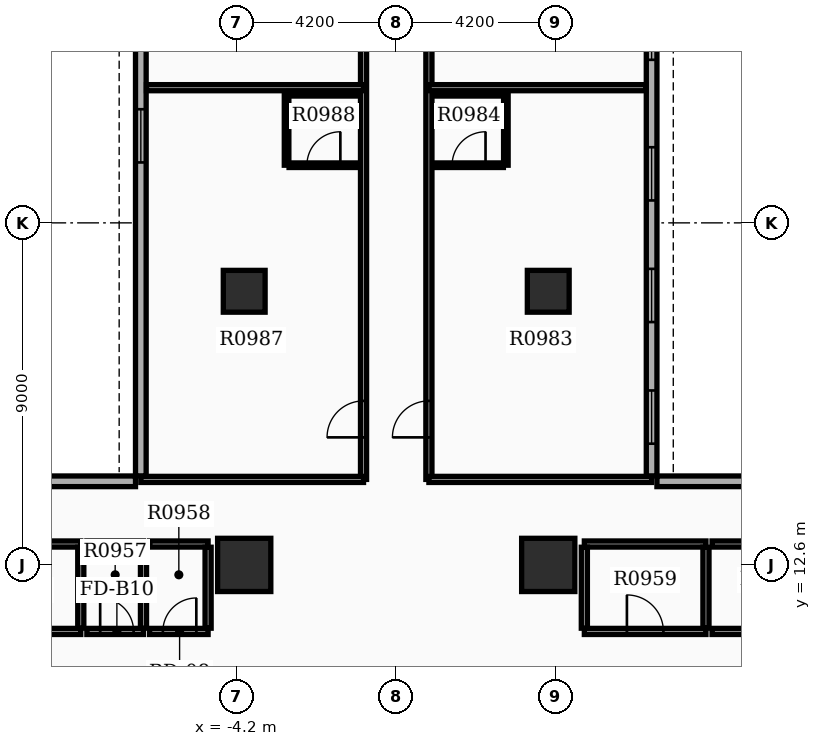
"""IFC4 building model, lengths in metres.
Left out: names, types, materials, properties, quantities, classifications, styles, units other than length and angle.
Written with IfcOpenShell. Run it as: python <this file> out.ifc"""

import sys

from ifc_helpers import new_model, si_unit, direction, frame, frame_2d, origin, origin_2d, place, context, subcontext, project, spatial, rectangle, extrude, element, fill, save


model = new_model("IFC4")
c1 = context("Model", 3, precision=1e-05, world=origin(), true_north=direction((0.0, 1.0)))
c2 = subcontext(c1, "Body", "Model", "MODEL_VIEW")
j1 = project(units=[si_unit("LENGTHUNIT", "METRE"), si_unit("PLANEANGLEUNIT", "RADIAN")], contexts=[c1])
p1 = place(None, origin())
s1 = spatial("IfcSite", under=j1, at=p1, CompositionType="ELEMENT")
p2 = place(p1, origin())
s2 = spatial("IfcBuilding", under=s1, at=p2, CompositionType="ELEMENT")
p3 = place(p2, frame((0.0, 0.0, 63.9)))
s3 = spatial("IfcBuildingStorey", under=s2, at=p3, CompositionType="ELEMENT", Elevation=63.9)
for number, where, z_axis, x_axis in (
    (1, (4.0, 12.6, 0.0), (0.0, 0.0, 1.0), (1.0, 0.0, 0.0)),
    (2, (-4.0, 12.6, 0.0), (0.0, 0.0, 1.0), (1.0, 0.0, 0.0)),
):
    element("IfcColumn", number, at=place(p3, frame(where, z_axis=z_axis, x_axis=x_axis)), inside=s3, PredefinedType="COLUMN", context=c2, shape_type="SweptSolid", body=[
        extrude(rectangle(XDim=1.4, YDim=1.4, at=origin_2d()), origin(), (0.0, 0.0, 1.0), 3.9),
    ])
for number, where, z_axis, x_axis in (
    (3, (-4.0, 19.8, 0.0), (0.0, 0.0, 1.0), (1.0, 0.0, 0.0)),
    (4, (4.0, 19.8, 0.0), (0.0, 0.0, 1.0), (1.0, 0.0, 0.0)),
):
    element("IfcColumn", number, at=place(p3, frame(where, z_axis=z_axis, x_axis=x_axis)), inside=s3, PredefinedType="COLUMN", context=c2, shape_type="SweptSolid", body=[
        extrude(rectangle(XDim=1.1, YDim=1.1, at=origin_2d()), origin(), (0.0, 0.0, 1.0), 3.9),
    ])
p4 = place(p3, frame((6.72, 14.94, 0.0), z_axis=(0.0, 0.0, 1.0), x_axis=(0.0, 1.0, 0.0)))
e5 = element("IfcWall", 5, at=p4, inside=s3, PredefinedType="STANDARD", context=c2, shape_type="SweptSolid", body=[
    extrude(rectangle(XDim=20.1, YDim=0.28, at=frame_2d((10.05, 0.0))), origin(), (0.0, 0.0, 1.0), 2.91),
])
p5 = place(p4, frame((0.85, 0.0, 0.8)))
e6 = element("IfcOpeningElement", 6, at=p5, cuts=e5, PredefinedType="OPENING", context=c2, shape_type="SweptSolid", body=[
    extrude(rectangle(XDim=1.4, YDim=1.6, at=frame_2d((0.7, 0.8))), frame((0.0, 0.15, 0.0), z_axis=(0.0, -1.0, 0.0), x_axis=(1.0, 0.0, 0.0)), (0.0, 0.0, 1.0), 0.3),
])
p6 = place(p4, frame((4.05, 0.0, 0.8)))
e7 = element("IfcOpeningElement", 7, at=p6, cuts=e5, PredefinedType="OPENING", context=c2, shape_type="SweptSolid", body=[
    extrude(rectangle(XDim=1.4, YDim=1.6, at=frame_2d((0.7, 0.8))), frame((0.0, 0.15, 0.0), z_axis=(0.0, -1.0, 0.0), x_axis=(1.0, 0.0, 0.0)), (0.0, 0.0, 1.0), 0.3),
])
p7 = place(p4, frame((7.25, 0.0, 0.8)))
e8 = element("IfcOpeningElement", 8, at=p7, cuts=e5, PredefinedType="OPENING", context=c2, shape_type="SweptSolid", body=[
    extrude(rectangle(XDim=1.4, YDim=1.6, at=frame_2d((0.7, 0.8))), frame((0.0, 0.15, 0.0), z_axis=(0.0, -1.0, 0.0), x_axis=(1.0, 0.0, 0.0)), (0.0, 0.0, 1.0), 0.3),
])
p8 = place(p4, frame((10.95, 0.0, 0.8)))
e9 = element("IfcOpeningElement", 9, at=p8, cuts=e5, PredefinedType="OPENING", context=c2, shape_type="SweptSolid", body=[
    extrude(rectangle(XDim=1.4, YDim=1.6, at=frame_2d((0.7, 0.8))), frame((0.0, 0.15, 0.0), z_axis=(0.0, -1.0, 0.0), x_axis=(1.0, 0.0, 0.0)), (0.0, 0.0, 1.0), 0.3),
])
p9 = place(p3, frame((-6.72, 35.04, 0.0), z_axis=(0.0, 0.0, 1.0), x_axis=(0.0, -1.0, 0.0)))
e10 = element("IfcWall", 10, at=p9, inside=s3, PredefinedType="STANDARD", context=c2, shape_type="SweptSolid", body=[
    extrude(rectangle(XDim=20.1, YDim=0.28, at=frame_2d((10.05, 0.0))), origin(), (0.0, 0.0, 1.0), 2.91),
])
p10 = place(p9, frame((0.85, 0.0, 0.8)))
e11 = element("IfcOpeningElement", 11, at=p10, cuts=e10, PredefinedType="OPENING", context=c2, shape_type="SweptSolid", body=[
    extrude(rectangle(XDim=1.4, YDim=1.6, at=frame_2d((0.7, 0.8))), frame((0.0, 0.15, 0.0), z_axis=(0.0, -1.0, 0.0), x_axis=(1.0, 0.0, 0.0)), (0.0, 0.0, 1.0), 0.3),
])
p11 = place(p9, frame((4.05, 0.0, 0.8)))
e12 = element("IfcOpeningElement", 12, at=p11, cuts=e10, PredefinedType="OPENING", context=c2, shape_type="SweptSolid", body=[
    extrude(rectangle(XDim=1.4, YDim=1.6, at=frame_2d((0.7, 0.8))), frame((0.0, 0.15, 0.0), z_axis=(0.0, -1.0, 0.0), x_axis=(1.0, 0.0, 0.0)), (0.0, 0.0, 1.0), 0.3),
])
p12 = place(p9, frame((7.25, 0.0, 0.8)))
e13 = element("IfcOpeningElement", 13, at=p12, cuts=e10, PredefinedType="OPENING", context=c2, shape_type="SweptSolid", body=[
    extrude(rectangle(XDim=1.4, YDim=1.6, at=frame_2d((0.7, 0.8))), frame((0.0, 0.15, 0.0), z_axis=(0.0, -1.0, 0.0), x_axis=(1.0, 0.0, 0.0)), (0.0, 0.0, 1.0), 0.3),
])
p13 = place(p9, frame((10.45, 0.0, 0.8)))
e14 = element("IfcOpeningElement", 14, at=p13, cuts=e10, PredefinedType="OPENING", context=c2, shape_type="SweptSolid", body=[
    extrude(rectangle(XDim=1.4, YDim=1.6, at=frame_2d((0.7, 0.8))), frame((0.0, 0.15, 0.0), z_axis=(0.0, -1.0, 0.0), x_axis=(1.0, 0.0, 0.0)), (0.0, 0.0, 1.0), 0.3),
])
for number, where, z_axis, x_axis in (
    (15, (13.16, 14.8, 0.0), (0.0, 0.0, 1.0), (-1.0, 0.0, 0.0)),
    (16, (-13.16, 14.8, 0.0), (0.0, 0.0, 1.0), (1.0, 0.0, 0.0)),
):
    element("IfcWall", number, at=place(p3, frame(where, z_axis=z_axis, x_axis=x_axis)), inside=s3, PredefinedType="STANDARD", context=c2, shape_type="SweptSolid", body=[
        extrude(rectangle(XDim=6.3, YDim=0.28, at=frame_2d((3.15, 0.0))), origin(), (0.0, 0.0, 1.0), 2.91),
    ])
p14 = place(p3, frame((-11.5, 10.85, 0.0), z_axis=(0.0, 0.0, 1.0), x_axis=(1.0, 0.0, 0.0)))
e17 = element("IfcWall", 17, at=p14, inside=s3, PredefinedType="PARTITIONING", context=c2, shape_type="SweptSolid", body=[
    extrude(rectangle(XDim=3.2, YDim=0.16, at=frame_2d((1.6, 0.0))), origin(), (0.0, 0.0, 1.0), 2.9),
])
p15 = place(p14, frame((1.12, 0.0, 0.0)))
e18 = element("IfcOpeningElement", 18, at=p15, cuts=e17, PredefinedType="OPENING", context=c2, shape_type="SweptSolid", body=[
    extrude(rectangle(XDim=0.96, YDim=2.15, at=frame_2d((0.48, 1.075))), frame((0.0, 0.09, 0.0), z_axis=(0.0, -1.0, 0.0), x_axis=(1.0, 0.0, 0.0)), (0.0, 0.0, 1.0), 0.18),
])
p16 = place(p3, frame((-11.5, 13.15, 0.0), z_axis=(0.0, 0.0, 1.0), x_axis=(1.0, 0.0, 0.0)))
e19 = element("IfcWall", 19, at=p16, inside=s3, PredefinedType="PARTITIONING", context=c2, shape_type="SweptSolid", body=[
    extrude(rectangle(XDim=3.2, YDim=0.16, at=frame_2d((1.6, 0.0))), origin(), (0.0, 0.0, 1.0), 2.9),
])
p17 = place(p3, frame((-8.3, 10.935, 0.0), z_axis=(0.0, 0.0, 1.0), x_axis=(0.0, 1.0, 0.0)))
e20 = element("IfcWall", 20, at=p17, inside=s3, PredefinedType="PARTITIONING", context=c2, shape_type="SweptSolid", body=[
    extrude(rectangle(XDim=2.13, YDim=0.16, at=frame_2d((1.065, 0.0))), origin(), (0.0, 0.0, 1.0), 2.9),
])
p18 = place(p3, frame((-8.14, 10.85, 0.0), z_axis=(0.0, 0.0, 1.0), x_axis=(1.0, 0.0, 0.0)))
e21 = element("IfcWall", 21, at=p18, inside=s3, PredefinedType="PARTITIONING", context=c2, shape_type="SweptSolid", body=[
    extrude(rectangle(XDim=1.49, YDim=0.16, at=frame_2d((0.745, 0.0))), origin(), (0.0, 0.0, 1.0), 2.9),
])
p19 = place(p18, frame((0.35, 0.0, 0.0)))
e22 = element("IfcOpeningElement", 22, at=p19, cuts=e21, PredefinedType="OPENING", context=c2, shape_type="SweptSolid", body=[
    extrude(rectangle(XDim=0.88, YDim=2.1, at=frame_2d((0.44, 1.05))), frame((0.0, 0.09, 0.0), z_axis=(0.0, -1.0, 0.0), x_axis=(1.0, 0.0, 0.0)), (0.0, 0.0, 1.0), 0.18),
])
p20 = place(p3, frame((-8.14, 13.15, 0.0), z_axis=(0.0, 0.0, 1.0), x_axis=(1.0, 0.0, 0.0)))
e23 = element("IfcWall", 23, at=p20, inside=s3, PredefinedType="PARTITIONING", context=c2, shape_type="SweptSolid", body=[
    extrude(rectangle(XDim=1.49, YDim=0.16, at=frame_2d((0.745, 0.0))), origin(), (0.0, 0.0, 1.0), 2.9),
])
p21 = place(p3, frame((-6.65, 10.935, 0.0), z_axis=(0.0, 0.0, 1.0), x_axis=(0.0, 1.0, 0.0)))
e24 = element("IfcWall", 24, at=p21, inside=s3, PredefinedType="PARTITIONING", context=c2, shape_type="SweptSolid", body=[
    extrude(rectangle(XDim=2.13, YDim=0.16, at=frame_2d((1.065, 0.0))), origin(), (0.0, 0.0, 1.0), 2.9),
])
p22 = place(p3, frame((-6.49, 10.85, 0.0), z_axis=(0.0, 0.0, 1.0), x_axis=(1.0, 0.0, 0.0)))
e25 = element("IfcWall", 25, at=p22, inside=s3, PredefinedType="PARTITIONING", context=c2, shape_type="SweptSolid", body=[
    extrude(rectangle(XDim=1.54, YDim=0.16, at=frame_2d((0.77, 0.0))), origin(), (0.0, 0.0, 1.0), 2.9),
])
p23 = place(p22, frame((0.35, 0.0, 0.0)))
e26 = element("IfcOpeningElement", 26, at=p23, cuts=e25, PredefinedType="OPENING", context=c2, shape_type="SweptSolid", body=[
    extrude(rectangle(XDim=0.88, YDim=2.15, at=frame_2d((0.44, 1.075))), frame((0.0, 0.09, 0.0), z_axis=(0.0, -1.0, 0.0), x_axis=(1.0, 0.0, 0.0)), (0.0, 0.0, 1.0), 0.18),
])
p24 = place(p3, frame((-6.49, 13.15, 0.0), z_axis=(0.0, 0.0, 1.0), x_axis=(1.0, 0.0, 0.0)))
e27 = element("IfcWall", 27, at=p24, inside=s3, PredefinedType="PARTITIONING", context=c2, shape_type="SweptSolid", body=[
    extrude(rectangle(XDim=1.54, YDim=0.16, at=frame_2d((0.77, 0.0))), origin(), (0.0, 0.0, 1.0), 2.9),
])
p25 = place(p3, frame((-4.95, 10.935, 0.0), z_axis=(0.0, 0.0, 1.0), x_axis=(0.0, 1.0, 0.0)))
e28 = element("IfcWall", 28, at=p25, inside=s3, PredefinedType="PARTITIONING", context=c2, shape_type="SweptSolid", body=[
    extrude(rectangle(XDim=2.13, YDim=0.16, at=frame_2d((1.065, 0.0))), origin(), (0.0, 0.0, 1.0), 2.9),
])
p26 = place(p3, frame((4.95, 10.85, 0.0), z_axis=(0.0, 0.0, 1.0), x_axis=(1.0, 0.0, 0.0)))
e29 = element("IfcWall", 29, at=p26, inside=s3, PredefinedType="PARTITIONING", context=c2, shape_type="SweptSolid", body=[
    extrude(rectangle(XDim=3.2, YDim=0.16, at=frame_2d((1.6, 0.0))), origin(), (0.0, 0.0, 1.0), 2.9),
])
p27 = place(p26, frame((1.12, 0.0, 0.0)))
e30 = element("IfcOpeningElement", 30, at=p27, cuts=e29, PredefinedType="OPENING", context=c2, shape_type="SweptSolid", body=[
    extrude(rectangle(XDim=0.96, YDim=2.15, at=frame_2d((0.48, 1.075))), frame((0.0, 0.09, 0.0), z_axis=(0.0, -1.0, 0.0), x_axis=(1.0, 0.0, 0.0)), (0.0, 0.0, 1.0), 0.18),
])
p28 = place(p3, frame((4.95, 13.15, 0.0), z_axis=(0.0, 0.0, 1.0), x_axis=(1.0, 0.0, 0.0)))
e31 = element("IfcWall", 31, at=p28, inside=s3, PredefinedType="PARTITIONING", context=c2, shape_type="SweptSolid", body=[
    extrude(rectangle(XDim=3.2, YDim=0.16, at=frame_2d((1.6, 0.0))), origin(), (0.0, 0.0, 1.0), 2.9),
])
for number, where, z_axis, x_axis in (
    (32, (4.95, 10.935, 0.0), (0.0, 0.0, 1.0), (0.0, 1.0, 0.0)),
    (33, (8.15, 10.935, 0.0), (0.0, 0.0, 1.0), (0.0, 1.0, 0.0)),
):
    element("IfcWall", number, at=place(p3, frame(where, z_axis=z_axis, x_axis=x_axis)), inside=s3, PredefinedType="PARTITIONING", context=c2, shape_type="SweptSolid", body=[
        extrude(rectangle(XDim=2.13, YDim=0.16, at=frame_2d((1.065, 0.0))), origin(), (0.0, 0.0, 1.0), 2.9),
    ])
p29 = place(p3, frame((8.31, 10.85, 0.0), z_axis=(0.0, 0.0, 1.0), x_axis=(1.0, 0.0, 0.0)))
e34 = element("IfcWall", 34, at=p29, inside=s3, PredefinedType="PARTITIONING", context=c2, shape_type="SweptSolid", body=[
    extrude(rectangle(XDim=3.14, YDim=0.16, at=frame_2d((1.57, 0.0))), origin(), (0.0, 0.0, 1.0), 2.9),
])
p30 = place(p29, frame((1.09, 0.0, 0.0)))
e35 = element("IfcOpeningElement", 35, at=p30, cuts=e34, PredefinedType="OPENING", context=c2, shape_type="SweptSolid", body=[
    extrude(rectangle(XDim=0.96, YDim=2.15, at=frame_2d((0.48, 1.075))), frame((0.0, 0.09, 0.0), z_axis=(0.0, -1.0, 0.0), x_axis=(1.0, 0.0, 0.0)), (0.0, 0.0, 1.0), 0.18),
])
p31 = place(p3, frame((8.31, 13.15, 0.0), z_axis=(0.0, 0.0, 1.0), x_axis=(1.0, 0.0, 0.0)))
e36 = element("IfcWall", 36, at=p31, inside=s3, PredefinedType="PARTITIONING", context=c2, shape_type="SweptSolid", body=[
    extrude(rectangle(XDim=3.14, YDim=0.16, at=frame_2d((1.57, 0.0))), origin(), (0.0, 0.0, 1.0), 2.9),
])
p32 = place(p3, frame((0.86, 14.85, 0.0), z_axis=(0.0, 0.0, 1.0), x_axis=(0.0, 1.0, 0.0)))
e37 = element("IfcWall", 37, at=p32, inside=s3, PredefinedType="PARTITIONING", context=c2, shape_type="SweptSolid", body=[
    extrude(rectangle(XDim=20.182, YDim=0.16, at=frame_2d((10.091, 0.0))), origin(), (0.0, 0.0, 1.0), 2.9),
])
p33 = place(p32, frame((1.106, 0.0, 0.0)))
e38 = element("IfcOpeningElement", 38, at=p33, cuts=e37, PredefinedType="OPENING", context=c2, shape_type="SweptSolid", body=[
    extrude(rectangle(XDim=0.96, YDim=2.15, at=frame_2d((0.48, 1.075))), frame((0.0, 0.09, 0.0), z_axis=(0.0, -1.0, 0.0), x_axis=(1.0, 0.0, 0.0)), (0.0, 0.0, 1.0), 0.18),
])
p34 = place(p32, frame((16.28, 0.0, 0.0)))
e39 = element("IfcOpeningElement", 39, at=p34, cuts=e37, PredefinedType="OPENING", context=c2, shape_type="SweptSolid", body=[
    extrude(rectangle(XDim=0.96, YDim=2.15, at=frame_2d((0.48, 1.075))), frame((0.0, 0.09, 0.0), z_axis=(0.0, -1.0, 0.0), x_axis=(1.0, 0.0, 0.0)), (0.0, 0.0, 1.0), 0.18),
])
p35 = place(p3, frame((0.86, 14.85, 0.0), z_axis=(0.0, 0.0, 1.0), x_axis=(1.0, 0.0, 0.0)))
e40 = element("IfcWall", 40, at=p35, inside=s3, PredefinedType="PARTITIONING", context=c2, shape_type="SweptSolid", body=[
    extrude(rectangle(XDim=5.86, YDim=0.16, at=frame_2d((2.93, 0.0))), origin(), (0.0, 0.0, 1.0), 2.9),
])
p36 = place(p3, frame((0.86, 25.157, 0.0), z_axis=(0.0, 0.0, 1.0), x_axis=(1.0, 0.0, 0.0)))
e41 = element("IfcWall", 41, at=p36, inside=s3, PredefinedType="PARTITIONING", context=c2, shape_type="SweptSolid", body=[
    extrude(rectangle(XDim=5.712, YDim=0.16, at=frame_2d((2.856, 0.0))), origin(), (0.0, 0.0, 1.0), 2.9),
])
p37 = place(p3, frame((1.0, 23.117, 0.0), z_axis=(0.0, 0.0, 1.0), x_axis=(1.0, 0.0, 0.0)))
e42 = element("IfcWall", 42, at=p37, inside=s3, PredefinedType="PARTITIONING", context=c2, shape_type="SweptSolid", body=[
    extrude(rectangle(XDim=1.82, YDim=0.12, at=frame_2d((0.91, 0.0))), origin(), (0.0, 0.0, 1.0), 2.9),
])
p38 = place(p37, frame((0.47, 0.0, 0.0)))
e43 = element("IfcOpeningElement", 43, at=p38, cuts=e42, PredefinedType="OPENING", context=c2, shape_type="SweptSolid", body=[
    extrude(rectangle(XDim=0.88, YDim=2.1, at=frame_2d((0.44, 1.05))), frame((0.0, 0.07, 0.0), z_axis=(0.0, -1.0, 0.0), x_axis=(1.0, 0.0, 0.0)), (0.0, 0.0, 1.0), 0.14),
])
p39 = place(p3, frame((1.0, 24.997, 0.0), z_axis=(0.0, 0.0, 1.0), x_axis=(1.0, 0.0, 0.0)))
e44 = element("IfcWall", 44, at=p39, inside=s3, PredefinedType="PARTITIONING", context=c2, shape_type="SweptSolid", body=[
    extrude(rectangle(XDim=1.82, YDim=0.12, at=frame_2d((0.91, 0.0))), origin(), (0.0, 0.0, 1.0), 2.9),
])
p40 = place(p3, frame((2.885, 23.117, 0.0), z_axis=(0.0, 0.0, 1.0), x_axis=(0.0, 1.0, 0.0)))
e45 = element("IfcWall", 45, at=p40, inside=s3, PredefinedType="PARTITIONING", context=c2, shape_type="SweptSolid", body=[
    extrude(rectangle(XDim=1.88, YDim=0.12, at=frame_2d((0.94, 0.0))), origin(), (0.0, 0.0, 1.0), 2.9),
])
p41 = place(p3, frame((-0.86, 14.85, 0.0), z_axis=(0.0, 0.0, 1.0), x_axis=(0.0, 1.0, 0.0)))
e46 = element("IfcWall", 46, at=p41, inside=s3, PredefinedType="PARTITIONING", context=c2, shape_type="SweptSolid", body=[
    extrude(rectangle(XDim=20.182, YDim=0.16, at=frame_2d((10.091, 0.0))), origin(), (0.0, 0.0, 1.0), 2.9),
])
p42 = place(p41, frame((1.106, 0.0, 0.0)))
e47 = element("IfcOpeningElement", 47, at=p42, cuts=e46, PredefinedType="OPENING", context=c2, shape_type="SweptSolid", body=[
    extrude(rectangle(XDim=0.96, YDim=2.15, at=frame_2d((0.48, 1.075))), frame((0.0, 0.09, 0.0), z_axis=(0.0, -1.0, 0.0), x_axis=(1.0, 0.0, 0.0)), (0.0, 0.0, 1.0), 0.18),
])
p43 = place(p41, frame((16.28, 0.0, 0.0)))
e48 = element("IfcOpeningElement", 48, at=p43, cuts=e46, PredefinedType="OPENING", context=c2, shape_type="SweptSolid", body=[
    extrude(rectangle(XDim=0.96, YDim=2.15, at=frame_2d((0.48, 1.075))), frame((0.0, 0.09, 0.0), z_axis=(0.0, -1.0, 0.0), x_axis=(1.0, 0.0, 0.0)), (0.0, 0.0, 1.0), 0.18),
])
p44 = place(p3, frame((-0.86, 14.85, 0.0), z_axis=(0.0, 0.0, 1.0), x_axis=(-1.0, 0.0, 0.0)))
e49 = element("IfcWall", 49, at=p44, inside=s3, PredefinedType="PARTITIONING", context=c2, shape_type="SweptSolid", body=[
    extrude(rectangle(XDim=5.86, YDim=0.16, at=frame_2d((2.93, 0.0))), origin(), (0.0, 0.0, 1.0), 2.9),
])
p45 = place(p3, frame((-0.86, 25.157, 0.0), z_axis=(0.0, 0.0, 1.0), x_axis=(-1.0, 0.0, 0.0)))
e50 = element("IfcWall", 50, at=p45, inside=s3, PredefinedType="PARTITIONING", context=c2, shape_type="SweptSolid", body=[
    extrude(rectangle(XDim=5.712, YDim=0.16, at=frame_2d((2.856, 0.0))), origin(), (0.0, 0.0, 1.0), 2.9),
])
p46 = place(p3, frame((-2.82, 23.117, 0.0), z_axis=(0.0, 0.0, 1.0), x_axis=(1.0, 0.0, 0.0)))
e51 = element("IfcWall", 51, at=p46, inside=s3, PredefinedType="PARTITIONING", context=c2, shape_type="SweptSolid", body=[
    extrude(rectangle(XDim=1.82, YDim=0.12, at=frame_2d((0.91, 0.0))), origin(), (0.0, 0.0, 1.0), 2.9),
])
p47 = place(p46, frame((0.47, 0.0, 0.0)))
e52 = element("IfcOpeningElement", 52, at=p47, cuts=e51, PredefinedType="OPENING", context=c2, shape_type="SweptSolid", body=[
    extrude(rectangle(XDim=0.88, YDim=2.1, at=frame_2d((0.44, 1.05))), frame((0.0, 0.07, 0.0), z_axis=(0.0, -1.0, 0.0), x_axis=(1.0, 0.0, 0.0)), (0.0, 0.0, 1.0), 0.14),
])
p48 = place(p3, frame((-2.82, 24.997, 0.0), z_axis=(0.0, 0.0, 1.0), x_axis=(1.0, 0.0, 0.0)))
e53 = element("IfcWall", 53, at=p48, inside=s3, PredefinedType="PARTITIONING", context=c2, shape_type="SweptSolid", body=[
    extrude(rectangle(XDim=1.82, YDim=0.12, at=frame_2d((0.91, 0.0))), origin(), (0.0, 0.0, 1.0), 2.9),
])
p49 = place(p3, frame((-2.885, 23.117, 0.0), z_axis=(0.0, 0.0, 1.0), x_axis=(0.0, 1.0, 0.0)))
e54 = element("IfcWall", 54, at=p49, inside=s3, PredefinedType="PARTITIONING", context=c2, shape_type="SweptSolid", body=[
    extrude(rectangle(XDim=1.88, YDim=0.12, at=frame_2d((0.94, 0.0))), origin(), (0.0, 0.0, 1.0), 2.9),
])
p50 = place(p5, origin())
e55 = element("IfcWindow", 55, at=p50, inside=s3, PartitioningType="SINGLE_PANEL", PredefinedType="WINDOW", context=c2, shape_type="SweptSolid", body=[
    extrude(rectangle(XDim=1.4, YDim=1.6, at=frame_2d((0.7, 0.8))), frame((0.0, 0.03, 0.0), z_axis=(0.0, -1.0, 0.0), x_axis=(1.0, 0.0, 0.0)), (0.0, 0.0, 1.0), 0.06),
])
fill(e6, e55)
p51 = place(p6, origin())
e56 = element("IfcWindow", 56, at=p51, inside=s3, PartitioningType="SINGLE_PANEL", PredefinedType="WINDOW", context=c2, shape_type="SweptSolid", body=[
    extrude(rectangle(XDim=1.4, YDim=1.6, at=frame_2d((0.7, 0.8))), frame((0.0, 0.03, 0.0), z_axis=(0.0, -1.0, 0.0), x_axis=(1.0, 0.0, 0.0)), (0.0, 0.0, 1.0), 0.06),
])
fill(e7, e56)
p52 = place(p7, origin())
e57 = element("IfcWindow", 57, at=p52, inside=s3, PartitioningType="SINGLE_PANEL", PredefinedType="WINDOW", context=c2, shape_type="SweptSolid", body=[
    extrude(rectangle(XDim=1.4, YDim=1.6, at=frame_2d((0.7, 0.8))), frame((0.0, 0.03, 0.0), z_axis=(0.0, -1.0, 0.0), x_axis=(1.0, 0.0, 0.0)), (0.0, 0.0, 1.0), 0.06),
])
fill(e8, e57)
p53 = place(p8, origin())
e58 = element("IfcWindow", 58, at=p53, inside=s3, PartitioningType="SINGLE_PANEL", PredefinedType="WINDOW", context=c2, shape_type="SweptSolid", body=[
    extrude(rectangle(XDim=1.4, YDim=1.6, at=frame_2d((0.7, 0.8))), frame((0.0, 0.03, 0.0), z_axis=(0.0, -1.0, 0.0), x_axis=(1.0, 0.0, 0.0)), (0.0, 0.0, 1.0), 0.06),
])
fill(e9, e58)
p54 = place(p13, origin())
e59 = element("IfcWindow", 59, at=p54, inside=s3, PartitioningType="SINGLE_PANEL", PredefinedType="WINDOW", context=c2, shape_type="SweptSolid", body=[
    extrude(rectangle(XDim=1.4, YDim=1.6, at=frame_2d((0.7, 0.8))), frame((0.0, 0.03, 0.0), z_axis=(0.0, -1.0, 0.0), x_axis=(1.0, 0.0, 0.0)), (0.0, 0.0, 1.0), 0.06),
])
fill(e14, e59)
p55 = place(p19, origin())
e60 = element("IfcDoor", 60, at=p55, inside=s3, OperationType="SINGLE_SWING_LEFT", PredefinedType="DOOR", context=c2, shape_type="SweptSolid", body=[
    extrude(rectangle(XDim=0.88, YDim=2.1, at=frame_2d((0.44, 1.05))), frame((0.0, 0.025, 0.0), z_axis=(0.0, -1.0, 0.0), x_axis=(1.0, 0.0, 0.0)), (0.0, 0.0, 1.0), 0.05),
])
fill(e22, e60)
p56 = place(p23, origin())
e61 = element("IfcDoor", 61, at=p56, inside=s3, OperationType="SINGLE_SWING_RIGHT", PredefinedType="DOOR", context=c2, shape_type="SweptSolid", body=[
    extrude(rectangle(XDim=0.88, YDim=2.15, at=frame_2d((0.44, 1.075))), frame((0.0, 0.025, 0.0), z_axis=(0.0, -1.0, 0.0), x_axis=(1.0, 0.0, 0.0)), (0.0, 0.0, 1.0), 0.05),
])
fill(e26, e61)
p57 = place(p27, origin())
e62 = element("IfcDoor", 62, at=p57, inside=s3, OperationType="SINGLE_SWING_LEFT", PredefinedType="DOOR", context=c2, shape_type="SweptSolid", body=[
    extrude(rectangle(XDim=0.96, YDim=2.15, at=frame_2d((0.48, 1.075))), frame((0.0, 0.025, 0.0), z_axis=(0.0, -1.0, 0.0), x_axis=(1.0, 0.0, 0.0)), (0.0, 0.0, 1.0), 0.05),
])
fill(e30, e62)
p58 = place(p33, origin())
e63 = element("IfcDoor", 63, at=p58, inside=s3, OperationType="SINGLE_SWING_LEFT", PredefinedType="DOOR", context=c2, shape_type="SweptSolid", body=[
    extrude(rectangle(XDim=0.96, YDim=2.15, at=frame_2d((0.48, 1.075))), frame((0.0, 0.025, 0.0), z_axis=(0.0, -1.0, 0.0), x_axis=(1.0, 0.0, 0.0)), (0.0, 0.0, 1.0), 0.05),
])
fill(e38, e63)
p59 = place(p38, origin())
e64 = element("IfcDoor", 64, at=p59, inside=s3, OperationType="SINGLE_SWING_RIGHT", PredefinedType="DOOR", context=c2, shape_type="SweptSolid", body=[
    extrude(rectangle(XDim=0.88, YDim=2.1, at=frame_2d((0.44, 1.05))), frame((0.0, 0.025, 0.0), z_axis=(0.0, -1.0, 0.0), x_axis=(1.0, 0.0, 0.0)), (0.0, 0.0, 1.0), 0.05),
])
fill(e43, e64)
p60 = place(p42, origin())
e65 = element("IfcDoor", 65, at=p60, inside=s3, OperationType="SINGLE_SWING_LEFT", PredefinedType="DOOR", context=c2, shape_type="SweptSolid", body=[
    extrude(rectangle(XDim=0.96, YDim=2.15, at=frame_2d((0.48, 1.075))), frame((0.0, 0.025, 0.0), z_axis=(0.0, -1.0, 0.0), x_axis=(1.0, 0.0, 0.0)), (0.0, 0.0, 1.0), 0.05),
])
fill(e47, e65)
p61 = place(p47, origin())
e66 = element("IfcDoor", 66, at=p61, inside=s3, OperationType="SINGLE_SWING_RIGHT", PredefinedType="DOOR", context=c2, shape_type="SweptSolid", body=[
    extrude(rectangle(XDim=0.88, YDim=2.1, at=frame_2d((0.44, 1.05))), frame((0.0, 0.025, 0.0), z_axis=(0.0, -1.0, 0.0), x_axis=(1.0, 0.0, 0.0)), (0.0, 0.0, 1.0), 0.05),
])
fill(e52, e66)
save(model, sys.argv[1])
